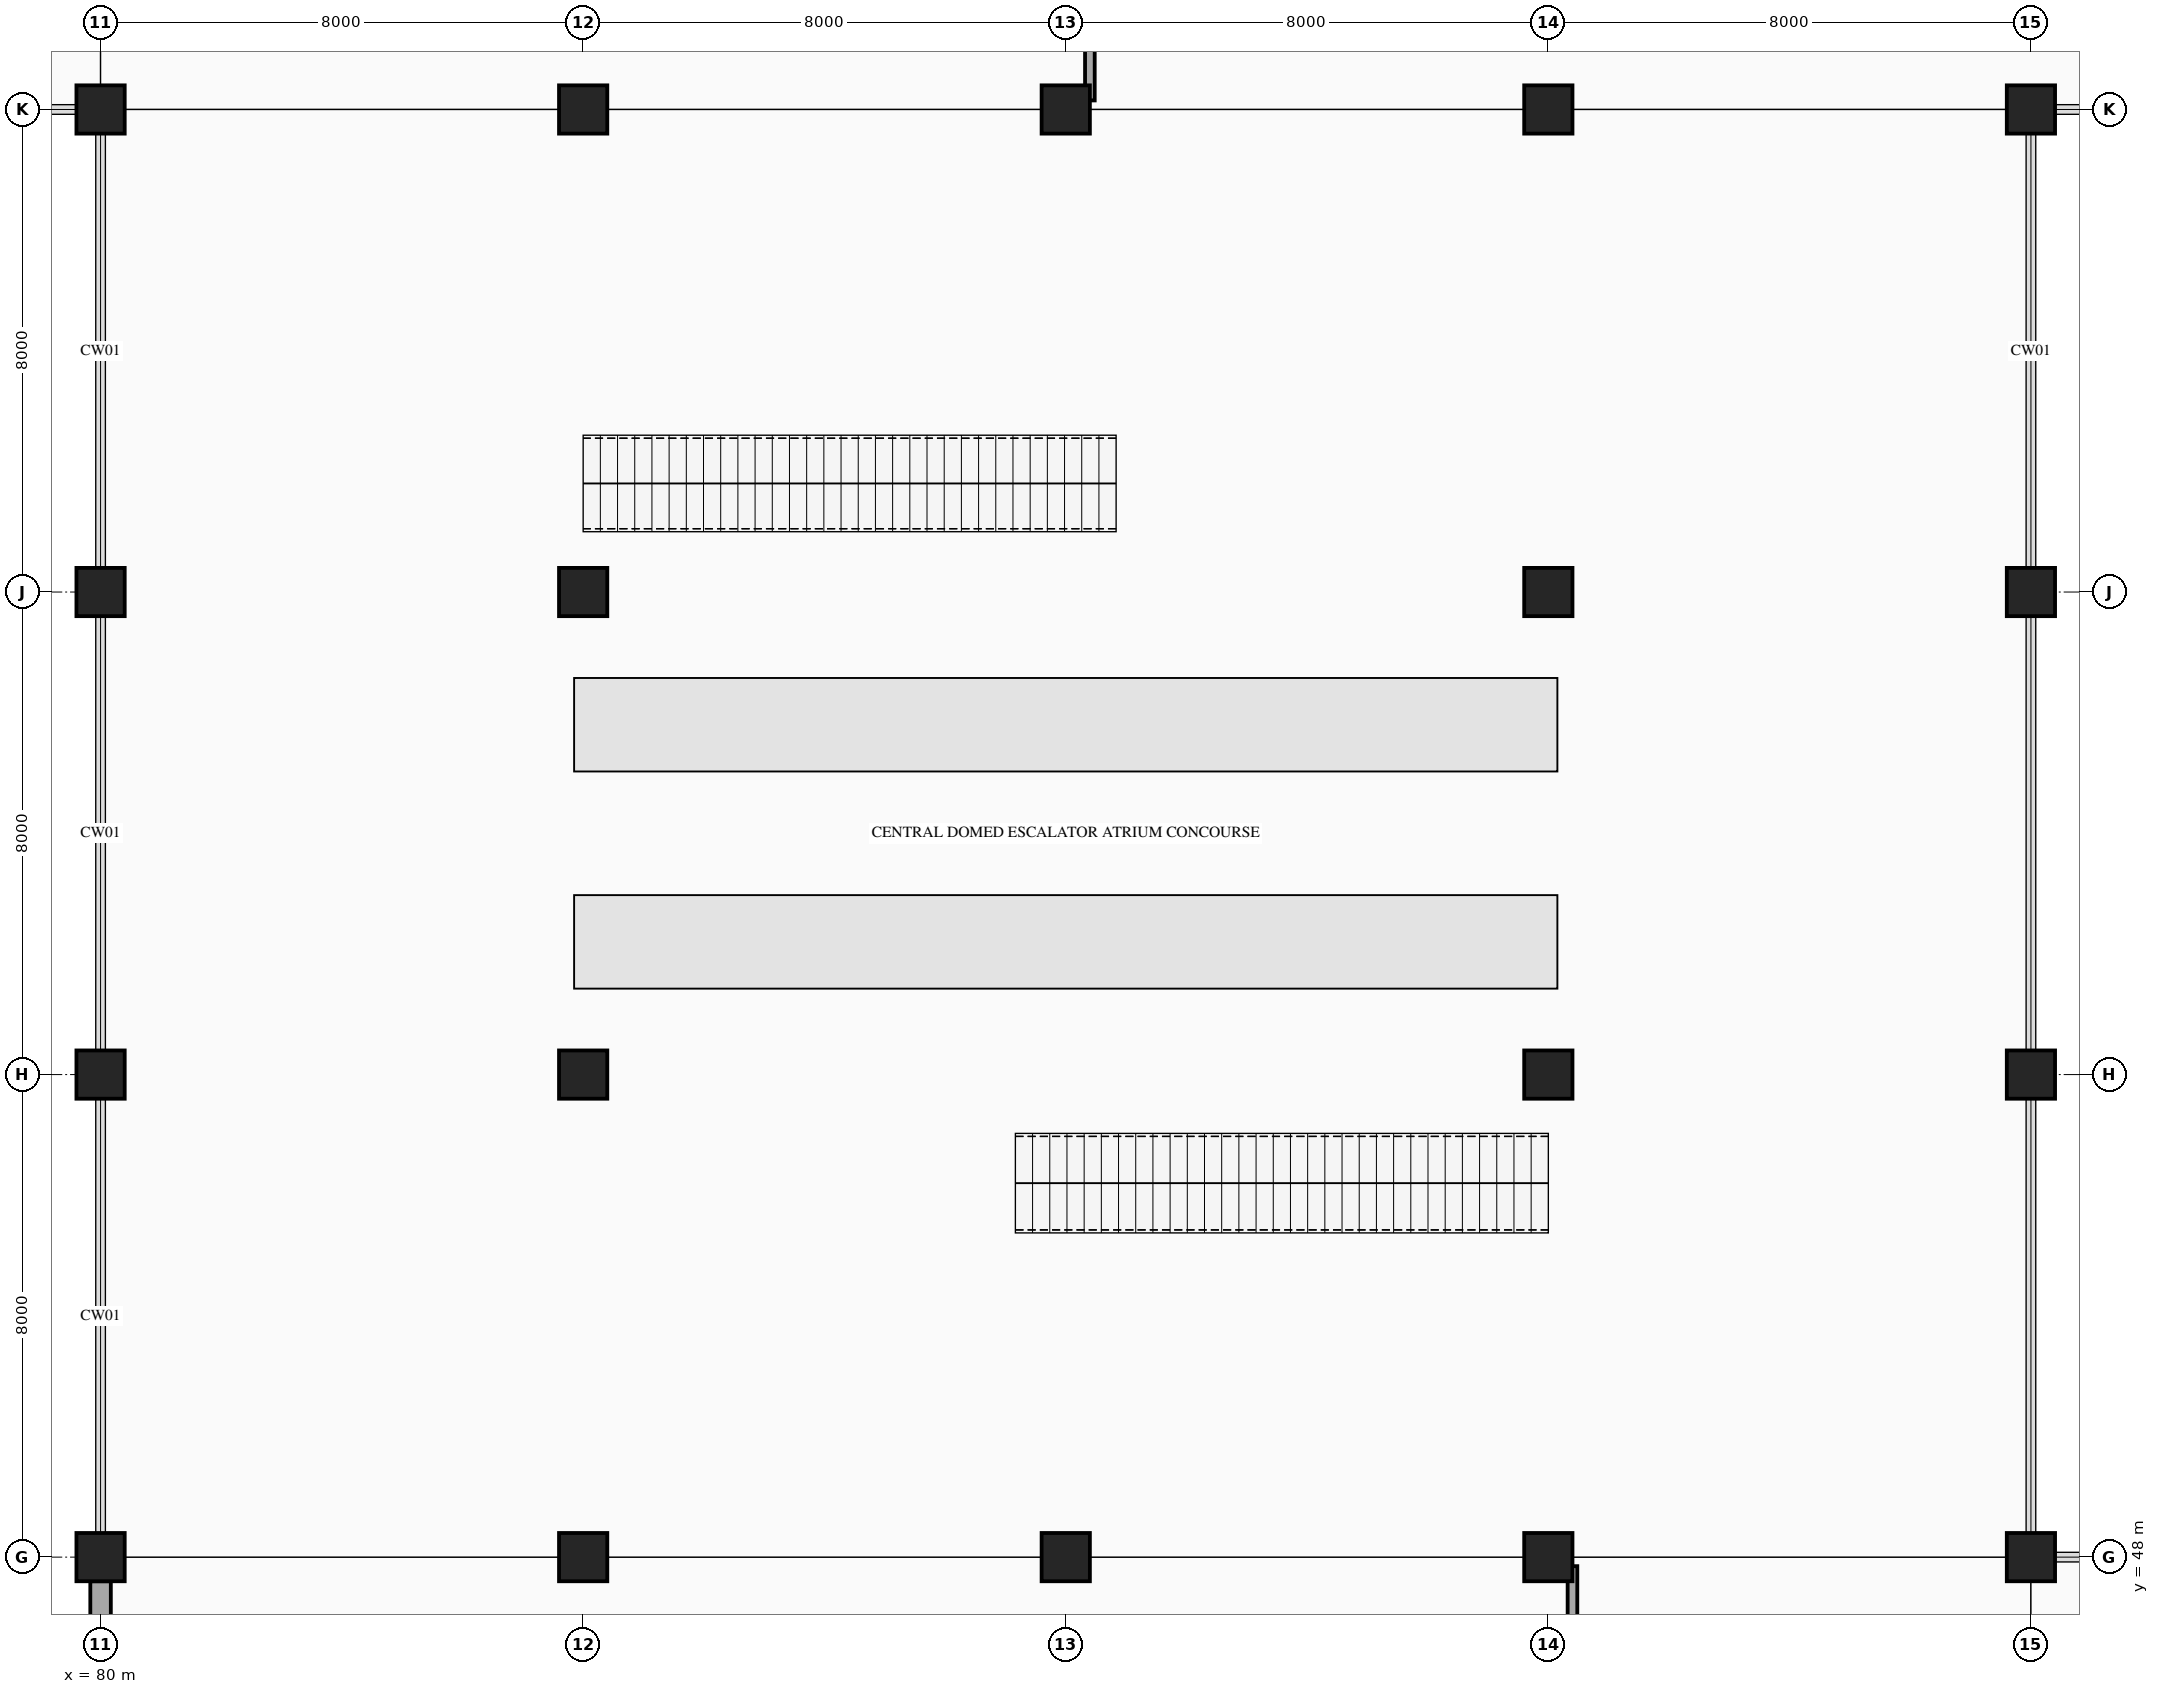
"""IFC4 building model, lengths in metres.
Left out: names, types, materials, properties, quantities, classifications, styles, units other than length and angle.
Written with IfcOpenShell. Run it as: python <this file> out.ifc"""

import sys

from ifc_helpers import new_model, si_unit, direction, frame, frame_2d, origin, origin_2d, place, context, subcontext, project, spatial, rectangle, circle, extrude, element, save


model = new_model("IFC4")
c1 = context("Model", 3, precision=1e-05, world=origin(), true_north=direction((0.0, 1.0)))
c2 = subcontext(c1, "Body", "Model", "MODEL_VIEW")
j1 = project(units=[si_unit("LENGTHUNIT", "METRE"), si_unit("PLANEANGLEUNIT", "RADIAN")], contexts=[c1])
p1 = place(None, origin())
s1 = spatial("IfcSite", under=j1, at=p1, CompositionType="ELEMENT")
p2 = place(p1, origin())
s2 = spatial("IfcBuilding", under=s1, at=p2, CompositionType="ELEMENT")
p3 = place(p2, origin())
s3 = spatial("IfcBuildingStorey", under=s2, at=p3, CompositionType="ELEMENT", Elevation=0.0)
p4 = place(p3, frame((80.0, 48.0, 0.0), z_axis=(0.0, 0.0, 1.0), x_axis=(1.0, 0.0, 0.0)))
e1 = element("IfcColumn", 1, at=p4, inside=s3, PredefinedType="COLUMN", context=c2, shape_type="SweptSolid", body=[
    extrude(circle(Radius=0.4, at=origin_2d()), origin(), (0.0, 0.0, 1.0), 5.6),
])
p5 = place(p3, frame((80.0, 56.0, 0.0), z_axis=(0.0, 0.0, 1.0), x_axis=(1.0, 0.0, 0.0)))
e2 = element("IfcColumn", 2, at=p5, inside=s3, PredefinedType="COLUMN", context=c2, shape_type="SweptSolid", body=[
    extrude(rectangle(XDim=0.8, YDim=0.8, at=origin_2d()), origin(), (0.0, 0.0, 1.0), 5.6),
])
p6 = place(p3, frame((80.0, 64.0, 0.0), z_axis=(0.0, 0.0, 1.0), x_axis=(1.0, 0.0, 0.0)))
e3 = element("IfcColumn", 3, at=p6, inside=s3, PredefinedType="COLUMN", context=c2, shape_type="SweptSolid", body=[
    extrude(circle(Radius=0.4, at=origin_2d()), origin(), (0.0, 0.0, 1.0), 5.6),
])
for number, where, z_axis, x_axis in (
    (4, (80.0, 72.0, 0.0), (0.0, 0.0, 1.0), (1.0, 0.0, 0.0)),
    (5, (88.0, 48.0, 0.0), (0.0, 0.0, 1.0), (1.0, 0.0, 0.0)),
):
    element("IfcColumn", number, at=place(p3, frame(where, z_axis=z_axis, x_axis=x_axis)), inside=s3, PredefinedType="COLUMN", context=c2, shape_type="SweptSolid", body=[
        extrude(rectangle(XDim=0.8, YDim=0.8, at=origin_2d()), origin(), (0.0, 0.0, 1.0), 5.6),
    ])
p7 = place(p3, frame((88.0, 56.0, 0.0), z_axis=(0.0, 0.0, 1.0), x_axis=(1.0, 0.0, 0.0)))
e6 = element("IfcColumn", 6, at=p7, inside=s3, PredefinedType="COLUMN", context=c2, shape_type="SweptSolid", body=[
    extrude(circle(Radius=0.4, at=origin_2d()), origin(), (0.0, 0.0, 1.0), 5.6),
])
p8 = place(p3, frame((88.0, 64.0, 0.0), z_axis=(0.0, 0.0, 1.0), x_axis=(1.0, 0.0, 0.0)))
e7 = element("IfcColumn", 7, at=p8, inside=s3, PredefinedType="COLUMN", context=c2, shape_type="SweptSolid", body=[
    extrude(rectangle(XDim=0.8, YDim=0.8, at=origin_2d()), origin(), (0.0, 0.0, 1.0), 5.6),
])
for number, where, z_axis, x_axis in (
    (8, (88.0, 72.0, 0.0), (0.0, 0.0, 1.0), (1.0, 0.0, 0.0)),
    (9, (96.0, 48.0, 0.0), (0.0, 0.0, 1.0), (1.0, 0.0, 0.0)),
):
    element("IfcColumn", number, at=place(p3, frame(where, z_axis=z_axis, x_axis=x_axis)), inside=s3, PredefinedType="COLUMN", context=c2, shape_type="SweptSolid", body=[
        extrude(circle(Radius=0.4, at=origin_2d()), origin(), (0.0, 0.0, 1.0), 5.6),
    ])
for number, where, z_axis, x_axis in (
    (10, (96.0, 72.0, 0.0), (0.0, 0.0, 1.0), (1.0, 0.0, 0.0)),
    (11, (104.0, 48.0, 0.0), (0.0, 0.0, 1.0), (1.0, 0.0, 0.0)),
):
    element("IfcColumn", number, at=place(p3, frame(where, z_axis=z_axis, x_axis=x_axis)), inside=s3, PredefinedType="COLUMN", context=c2, shape_type="SweptSolid", body=[
        extrude(rectangle(XDim=0.8, YDim=0.8, at=origin_2d()), origin(), (0.0, 0.0, 1.0), 5.6),
    ])
p9 = place(p3, frame((104.0, 56.0, 0.0), z_axis=(0.0, 0.0, 1.0), x_axis=(1.0, 0.0, 0.0)))
e12 = element("IfcColumn", 12, at=p9, inside=s3, PredefinedType="COLUMN", context=c2, shape_type="SweptSolid", body=[
    extrude(circle(Radius=0.4, at=origin_2d()), origin(), (0.0, 0.0, 1.0), 5.6),
])
p10 = place(p3, frame((104.0, 64.0, 0.0), z_axis=(0.0, 0.0, 1.0), x_axis=(1.0, 0.0, 0.0)))
e13 = element("IfcColumn", 13, at=p10, inside=s3, PredefinedType="COLUMN", context=c2, shape_type="SweptSolid", body=[
    extrude(rectangle(XDim=0.8, YDim=0.8, at=origin_2d()), origin(), (0.0, 0.0, 1.0), 5.6),
])
for number, where, z_axis, x_axis in (
    (14, (104.0, 72.0, 0.0), (0.0, 0.0, 1.0), (1.0, 0.0, 0.0)),
    (15, (112.0, 48.0, 0.0), (0.0, 0.0, 1.0), (1.0, 0.0, 0.0)),
):
    element("IfcColumn", number, at=place(p3, frame(where, z_axis=z_axis, x_axis=x_axis)), inside=s3, PredefinedType="COLUMN", context=c2, shape_type="SweptSolid", body=[
        extrude(circle(Radius=0.4, at=origin_2d()), origin(), (0.0, 0.0, 1.0), 5.6),
    ])
p11 = place(p3, frame((112.0, 56.0, 0.0), z_axis=(0.0, 0.0, 1.0), x_axis=(1.0, 0.0, 0.0)))
e16 = element("IfcColumn", 16, at=p11, inside=s3, PredefinedType="COLUMN", context=c2, shape_type="SweptSolid", body=[
    extrude(rectangle(XDim=0.8, YDim=0.8, at=origin_2d()), origin(), (0.0, 0.0, 1.0), 5.6),
])
p12 = place(p3, frame((112.0, 64.0, 0.0), z_axis=(0.0, 0.0, 1.0), x_axis=(1.0, 0.0, 0.0)))
e17 = element("IfcColumn", 17, at=p12, inside=s3, PredefinedType="COLUMN", context=c2, shape_type="SweptSolid", body=[
    extrude(circle(Radius=0.4, at=origin_2d()), origin(), (0.0, 0.0, 1.0), 5.6),
])
p13 = place(p3, frame((112.0, 72.0, 0.0), z_axis=(0.0, 0.0, 1.0), x_axis=(1.0, 0.0, 0.0)))
e18 = element("IfcColumn", 18, at=p13, inside=s3, PredefinedType="COLUMN", context=c2, shape_type="SweptSolid", body=[
    extrude(rectangle(XDim=0.8, YDim=0.8, at=origin_2d()), origin(), (0.0, 0.0, 1.0), 5.6),
])
p14 = place(p3, frame((80.0, 40.178, 0.0), z_axis=(0.0, 0.0, 1.0), x_axis=(0.0, 1.0, 0.0)))
e19 = element("IfcWall", 19, at=p14, inside=s3, PredefinedType="STANDARD", context=c2, shape_type="SweptSolid", body=[
    extrude(rectangle(XDim=7.422, YDim=0.34, at=frame_2d((3.711, 0.0))), origin(), (0.0, 0.0, 1.0), 4.58),
])
p15 = place(p14, frame((2.711, 0.0, 0.0)))
e20 = element("IfcOpeningElement", 20, at=p15, cuts=e19, PredefinedType="OPENING", context=c2, shape_type="SweptSolid", body=[
    extrude(rectangle(XDim=2.0, YDim=2.35, at=frame_2d((1.0, 1.175))), frame((0.0, 0.18, 0.0), z_axis=(0.0, -1.0, 0.0), x_axis=(1.0, 0.0, 0.0)), (0.0, 0.0, 1.0), 0.36),
])
p16 = place(p3, frame((96.4, 72.15, 0.0), z_axis=(0.0, 0.0, 1.0), x_axis=(0.0, 1.0, 0.0)))
e21 = element("IfcWall", 21, at=p16, inside=s3, PredefinedType="PARTITIONING", context=c2, shape_type="SweptSolid", body=[
    extrude(rectangle(XDim=28.05, YDim=0.16, at=frame_2d((14.025, 0.0))), origin(), (0.0, 0.0, 1.0), 4.58),
])
p17 = place(p16, frame((18.801, 0.0, 0.0)))
e22 = element("IfcOpeningElement", 22, at=p17, cuts=e21, PredefinedType="OPENING", context=c2, shape_type="SweptSolid", body=[
    extrude(rectangle(XDim=1.9, YDim=2.3, at=frame_2d((0.95, 1.15))), frame((0.0, 0.09, 0.0), z_axis=(0.0, -1.0, 0.0), x_axis=(1.0, 0.0, 0.0)), (0.0, 0.0, 1.0), 0.18),
])
p18 = place(p3, frame((104.4, 19.2, 0.0), z_axis=(0.0, 0.0, 1.0), x_axis=(0.0, 1.0, 0.0)))
e23 = element("IfcWall", 23, at=p18, inside=s3, PredefinedType="PARTITIONING", context=c2, shape_type="SweptSolid", body=[
    extrude(rectangle(XDim=28.65, YDim=0.16, at=frame_2d((14.325, 0.0))), origin(), (0.0, 0.0, 1.0), 4.58),
])
p19 = place(p18, frame((15.906, 0.0, 0.0)))
e24 = element("IfcOpeningElement", 24, at=p19, cuts=e23, PredefinedType="OPENING", context=c2, shape_type="SweptSolid", body=[
    extrude(rectangle(XDim=1.7, YDim=2.25, at=frame_2d((0.85, 1.125))), frame((0.0, 0.09, 0.0), z_axis=(0.0, -1.0, 0.0), x_axis=(1.0, 0.0, 0.0)), (0.0, 0.0, 1.0), 0.18),
])
save(model, sys.argv[1])
